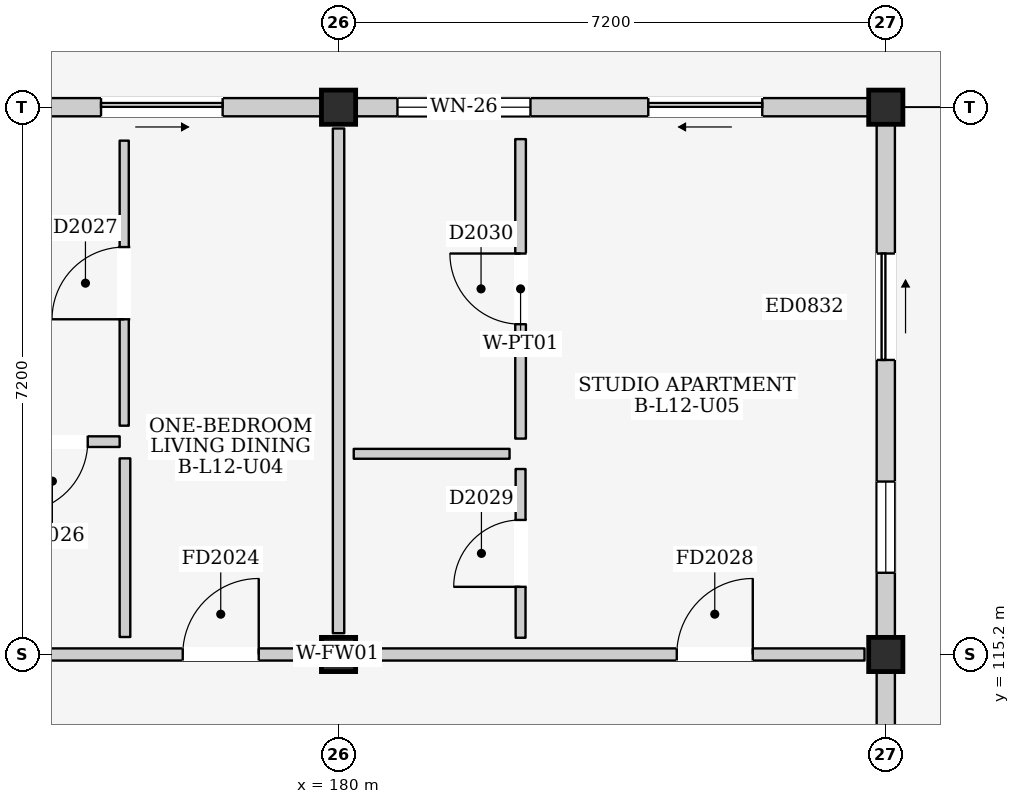
"""IFC4 building model, lengths in metres.
Left out: names, types, materials, properties, quantities, classifications, styles, units other than length and angle.
Written with IfcOpenShell. Run it as: python <this file> out.ifc"""

import sys

from ifc_helpers import new_model, si_unit, direction, frame, frame_2d, origin, origin_2d, place, context, subcontext, project, spatial, rectangle, extrude, element, fill, save


model = new_model("IFC4")
c1 = context("Model", 3, precision=1e-05, world=origin(), true_north=direction((0.0, 1.0)))
c2 = subcontext(c1, "Body", "Model", "MODEL_VIEW")
j1 = project(units=[si_unit("LENGTHUNIT", "METRE"), si_unit("PLANEANGLEUNIT", "RADIAN")], contexts=[c1])
p1 = place(None, origin())
s1 = spatial("IfcSite", under=j1, at=p1, CompositionType="ELEMENT")
p2 = place(p1, origin())
s2 = spatial("IfcBuilding", under=s1, at=p2, CompositionType="ELEMENT")
p3 = place(p2, frame((0.0, 0.0, 41.2)))
s3 = spatial("IfcBuildingStorey", under=s2, at=p3, CompositionType="ELEMENT", Elevation=41.2)
for number, where, z_axis, x_axis in (
    (1, (180.0, 115.2, 0.0), (0.0, 0.0, 1.0), (1.0, 0.0, 0.0)),
    (2, (180.0, 122.4, 0.0), (0.0, 0.0, 1.0), (1.0, 0.0, 0.0)),
    (3, (187.2, 115.2, 0.0), (0.0, 0.0, 1.0), (1.0, 0.0, 0.0)),
    (4, (187.2, 122.4, 0.0), (0.0, 0.0, 1.0), (1.0, 0.0, 0.0)),
):
    element("IfcColumn", number, at=place(p3, frame(where, z_axis=z_axis, x_axis=x_axis)), inside=s3, PredefinedType="COLUMN", context=c2, shape_type="SweptSolid", body=[
        extrude(rectangle(XDim=0.45, YDim=0.45, at=origin_2d()), origin(), (0.0, 0.0, 1.0), 3.2),
    ])
p4 = place(p3, frame((173.025, 122.4, 0.0), z_axis=(0.0, 0.0, 1.0), x_axis=(1.0, 0.0, 0.0)))
e5 = element("IfcWall", 5, at=p4, inside=s3, PredefinedType="ELEMENTEDWALL", context=c2, shape_type="SweptSolid", body=[
    extrude(rectangle(XDim=6.75, YDim=0.24, at=frame_2d((3.375, 0.0))), origin(), (0.0, 0.0, 1.0), 2.495),
])
p5 = place(p4, frame((3.85, 0.0, 0.0)))
e6 = element("IfcOpeningElement", 6, at=p5, cuts=e5, PredefinedType="OPENING", context=c2, shape_type="SweptSolid", body=[
    extrude(rectangle(XDim=1.6, YDim=2.12, at=frame_2d((0.8, 1.06))), frame((0.0, 0.135, 0.0), z_axis=(0.0, -1.0, 0.0), x_axis=(1.0, 0.0, 0.0)), (0.0, 0.0, 1.0), 0.27),
])
p6 = place(p4, frame((0.55, 0.0, 0.78)))
e7 = element("IfcOpeningElement", 7, at=p6, cuts=e5, PredefinedType="OPENING", context=c2, shape_type="SweptSolid", body=[
    extrude(rectangle(XDim=2.05, YDim=1.6, at=frame_2d((1.025, 0.8))), frame((0.0, 0.135, 0.0), z_axis=(0.0, -1.0, 0.0), x_axis=(1.0, 0.0, 0.0)), (0.0, 0.0, 1.0), 0.27),
])
p7 = place(p3, frame((187.2, 108.225, 0.0), z_axis=(0.0, 0.0, 1.0), x_axis=(0.0, 1.0, 0.0)))
e8 = element("IfcWall", 8, at=p7, inside=s3, PredefinedType="ELEMENTEDWALL", context=c2, shape_type="SweptSolid", body=[
    extrude(rectangle(XDim=6.75, YDim=0.24, at=frame_2d((3.375, 0.0))), origin(), (0.0, 0.0, 1.0), 2.495),
])
p8 = place(p7, frame((3.65, 0.0, 0.0)))
e9 = element("IfcOpeningElement", 9, at=p8, cuts=e8, PredefinedType="OPENING", context=c2, shape_type="SweptSolid", body=[
    extrude(rectangle(XDim=1.4, YDim=2.1, at=frame_2d((0.7, 1.05))), frame((0.0, 0.135, 0.0), z_axis=(0.0, -1.0, 0.0), x_axis=(1.0, 0.0, 0.0)), (0.0, 0.0, 1.0), 0.27),
])
p9 = place(p3, frame((180.225, 122.4, 0.0), z_axis=(0.0, 0.0, 1.0), x_axis=(1.0, 0.0, 0.0)))
e10 = element("IfcWall", 10, at=p9, inside=s3, PredefinedType="ELEMENTEDWALL", context=c2, shape_type="SweptSolid", body=[
    extrude(rectangle(XDim=6.75, YDim=0.24, at=frame_2d((3.375, 0.0))), origin(), (0.0, 0.0, 1.0), 2.495),
])
p10 = place(p9, frame((3.85, 0.0, 0.0)))
e11 = element("IfcOpeningElement", 11, at=p10, cuts=e10, PredefinedType="OPENING", context=c2, shape_type="SweptSolid", body=[
    extrude(rectangle(XDim=1.5, YDim=2.12, at=frame_2d((0.75, 1.06))), frame((0.0, 0.135, 0.0), z_axis=(0.0, -1.0, 0.0), x_axis=(1.0, 0.0, 0.0)), (0.0, 0.0, 1.0), 0.27),
])
p11 = place(p9, frame((0.55, 0.0, 0.83)))
e12 = element("IfcOpeningElement", 12, at=p11, cuts=e10, PredefinedType="OPENING", context=c2, shape_type="SweptSolid", body=[
    extrude(rectangle(XDim=1.75, YDim=1.55, at=frame_2d((0.875, 0.775))), frame((0.0, 0.135, 0.0), z_axis=(0.0, -1.0, 0.0), x_axis=(1.0, 0.0, 0.0)), (0.0, 0.0, 1.0), 0.27),
])
p12 = place(p3, frame((187.2, 115.425, 0.0), z_axis=(0.0, 0.0, 1.0), x_axis=(0.0, 1.0, 0.0)))
e13 = element("IfcWall", 13, at=p12, inside=s3, PredefinedType="ELEMENTEDWALL", context=c2, shape_type="SweptSolid", body=[
    extrude(rectangle(XDim=6.75, YDim=0.24, at=frame_2d((3.375, 0.0))), origin(), (0.0, 0.0, 1.0), 2.495),
])
p13 = place(p12, frame((3.65, 0.0, 0.0)))
e14 = element("IfcOpeningElement", 14, at=p13, cuts=e13, PredefinedType="OPENING", context=c2, shape_type="SweptSolid", body=[
    extrude(rectangle(XDim=1.4, YDim=2.1, at=frame_2d((0.7, 1.05))), frame((0.0, 0.135, 0.0), z_axis=(0.0, -1.0, 0.0), x_axis=(1.0, 0.0, 0.0)), (0.0, 0.0, 1.0), 0.27),
])
p14 = place(p12, frame((0.85, 0.0, 0.95)))
e15 = element("IfcOpeningElement", 15, at=p14, cuts=e13, PredefinedType="OPENING", context=c2, shape_type="SweptSolid", body=[
    extrude(rectangle(XDim=1.2, YDim=1.35, at=frame_2d((0.6, 0.675))), frame((0.0, 0.135, 0.0), z_axis=(0.0, -1.0, 0.0), x_axis=(1.0, 0.0, 0.0)), (0.0, 0.0, 1.0), 0.27),
])
p15 = place(p3, frame((173.055, 115.2, 0.0), z_axis=(0.0, 0.0, 1.0), x_axis=(1.0, 0.0, 0.0)))
e16 = element("IfcWall", 16, at=p15, inside=s3, PredefinedType="PARTITIONING", context=c2, shape_type="SweptSolid", body=[
    extrude(rectangle(XDim=6.69, YDim=0.16, at=frame_2d((3.345, 0.0))), origin(), (0.0, 0.0, 1.0), 2.345),
])
p16 = place(p15, frame((4.895, 0.0, 0.0)))
e17 = element("IfcOpeningElement", 17, at=p16, cuts=e16, PredefinedType="OPENING", context=c2, shape_type="SweptSolid", body=[
    extrude(rectangle(XDim=1.0, YDim=2.15, at=frame_2d((0.5, 1.075))), frame((0.0, 0.095, 0.0), z_axis=(0.0, -1.0, 0.0), x_axis=(1.0, 0.0, 0.0)), (0.0, 0.0, 1.0), 0.19),
])
p17 = place(p3, frame((180.0, 115.48, 0.0), z_axis=(0.0, 0.0, 1.0), x_axis=(0.0, 1.0, 0.0)))
e18 = element("IfcWall", 18, at=p17, inside=s3, PredefinedType="PARTITIONING", context=c2, shape_type="SweptSolid", body=[
    extrude(rectangle(XDim=6.64, YDim=0.15, at=frame_2d((3.32, 0.0))), origin(), (0.0, 0.0, 1.0), 2.445),
])
p18 = place(p3, frame((175.35, 118.0, 0.0), z_axis=(0.0, 0.0, 1.0), x_axis=(1.0, 0.0, 0.0)))
e19 = element("IfcWall", 19, at=p18, inside=s3, PredefinedType="PARTITIONING", context=c2, shape_type="SweptSolid", body=[
    extrude(rectangle(XDim=1.77, YDim=0.14, at=frame_2d((0.885, 0.0))), origin(), (0.0, 0.0, 1.0), 2.95),
])
p19 = place(p18, frame((0.42, 0.0, 0.0)))
e20 = element("IfcOpeningElement", 20, at=p19, cuts=e19, PredefinedType="OPENING", context=c2, shape_type="SweptSolid", body=[
    extrude(rectangle(XDim=0.93, YDim=2.14, at=frame_2d((0.465, 1.07))), frame((0.0, 0.085, 0.0), z_axis=(0.0, -1.0, 0.0), x_axis=(1.0, 0.0, 0.0)), (0.0, 0.0, 1.0), 0.17),
])
p20 = place(p3, frame((177.19, 115.43, 0.0), z_axis=(0.0, 0.0, 1.0), x_axis=(0.0, 1.0, 0.0)))
e21 = element("IfcWall", 21, at=p20, inside=s3, PredefinedType="PARTITIONING", context=c2, shape_type="SweptSolid", body=[
    extrude(rectangle(XDim=2.35, YDim=0.14, at=frame_2d((1.175, 0.0))), origin(), (0.0, 0.0, 1.0), 2.95),
])
p21 = place(p3, frame((177.18, 118.21, 0.0), z_axis=(0.0, 0.0, 1.0), x_axis=(0.0, 1.0, 0.0)))
e22 = element("IfcWall", 22, at=p21, inside=s3, PredefinedType="PARTITIONING", context=c2, shape_type="SweptSolid", body=[
    extrude(rectangle(XDim=3.75, YDim=0.12, at=frame_2d((1.875, 0.0))), origin(), (0.0, 0.0, 1.0), 2.95),
])
p22 = place(p21, frame((1.4, 0.0, 0.0)))
e23 = element("IfcOpeningElement", 23, at=p22, cuts=e22, PredefinedType="OPENING", context=c2, shape_type="SweptSolid", body=[
    extrude(rectangle(XDim=0.95, YDim=2.15, at=frame_2d((0.475, 1.075))), frame((0.0, 0.075, 0.0), z_axis=(0.0, -1.0, 0.0), x_axis=(1.0, 0.0, 0.0)), (0.0, 0.0, 1.0), 0.15),
])
p23 = place(p3, frame((180.255, 115.2, 0.0), z_axis=(0.0, 0.0, 1.0), x_axis=(1.0, 0.0, 0.0)))
e24 = element("IfcWall", 24, at=p23, inside=s3, PredefinedType="PARTITIONING", context=c2, shape_type="SweptSolid", body=[
    extrude(rectangle(XDim=6.665, YDim=0.16, at=frame_2d((3.333, 0.0))), origin(), (0.0, 0.0, 1.0), 2.345),
])
p24 = place(p23, frame((4.195, 0.0, 0.0)))
e25 = element("IfcOpeningElement", 25, at=p24, cuts=e24, PredefinedType="OPENING", context=c2, shape_type="SweptSolid", body=[
    extrude(rectangle(XDim=1.0, YDim=2.15, at=frame_2d((0.5, 1.075))), frame((0.0, 0.095, 0.0), z_axis=(0.0, -1.0, 0.0), x_axis=(1.0, 0.0, 0.0)), (0.0, 0.0, 1.0), 0.19),
])
p25 = place(p3, frame((180.2, 117.84, 0.0), z_axis=(0.0, 0.0, 1.0), x_axis=(1.0, 0.0, 0.0)))
e26 = element("IfcWall", 26, at=p25, inside=s3, PredefinedType="PARTITIONING", context=c2, shape_type="SweptSolid", body=[
    extrude(rectangle(XDim=2.05, YDim=0.13, at=frame_2d((1.025, 0.0))), origin(), (0.0, 0.0, 1.0), 2.95),
])
p26 = place(p3, frame((182.395, 115.42, 0.0), z_axis=(0.0, 0.0, 1.0), x_axis=(0.0, 1.0, 0.0)))
e27 = element("IfcWall", 27, at=p26, inside=s3, PredefinedType="PARTITIONING", context=c2, shape_type="SweptSolid", body=[
    extrude(rectangle(XDim=2.22, YDim=0.13, at=frame_2d((1.11, 0.0))), origin(), (0.0, 0.0, 1.0), 2.95),
])
p27 = place(p26, frame((0.67, 0.0, 0.0)))
e28 = element("IfcOpeningElement", 28, at=p27, cuts=e27, PredefinedType="OPENING", context=c2, shape_type="SweptSolid", body=[
    extrude(rectangle(XDim=0.88, YDim=2.1, at=frame_2d((0.44, 1.05))), frame((0.0, 0.08, 0.0), z_axis=(0.0, -1.0, 0.0), x_axis=(1.0, 0.0, 0.0)), (0.0, 0.0, 1.0), 0.16),
])
p28 = place(p3, frame((182.395, 118.04, 0.0), z_axis=(0.0, 0.0, 1.0), x_axis=(0.0, 1.0, 0.0)))
e29 = element("IfcWall", 29, at=p28, inside=s3, PredefinedType="PARTITIONING", context=c2, shape_type="SweptSolid", body=[
    extrude(rectangle(XDim=3.94, YDim=0.14, at=frame_2d((1.97, 0.0))), origin(), (0.0, 0.0, 1.0), 2.95),
])
p29 = place(p28, frame((1.505, 0.0, 0.0)))
e30 = element("IfcOpeningElement", 30, at=p29, cuts=e29, PredefinedType="OPENING", context=c2, shape_type="SweptSolid", body=[
    extrude(rectangle(XDim=0.93, YDim=2.14, at=frame_2d((0.465, 1.07))), frame((0.0, 0.085, 0.0), z_axis=(0.0, -1.0, 0.0), x_axis=(1.0, 0.0, 0.0)), (0.0, 0.0, 1.0), 0.17),
])
p30 = place(p5, frame((1.6, 0.0, 0.0), z_axis=(0.0, 0.0, 1.0), x_axis=(-1.0, 0.0, 0.0)))
e31 = element("IfcDoor", 31, at=p30, inside=s3, OperationType="SLIDING_TO_RIGHT", PredefinedType="DOOR", context=c2, shape_type="SweptSolid", body=[
    extrude(rectangle(XDim=1.6, YDim=2.12, at=frame_2d((0.8, 1.06))), frame((0.0, 0.025, 0.0), z_axis=(0.0, -1.0, 0.0), x_axis=(1.0, 0.0, 0.0)), (0.0, 0.0, 1.0), 0.05),
])
fill(e6, e31)
p31 = place(p10, frame((1.5, 0.0, 0.0), z_axis=(0.0, 0.0, 1.0), x_axis=(-1.0, 0.0, 0.0)))
e32 = element("IfcDoor", 32, at=p31, inside=s3, OperationType="SLIDING_TO_LEFT", PredefinedType="DOOR", context=c2, shape_type="SweptSolid", body=[
    extrude(rectangle(XDim=1.5, YDim=2.12, at=frame_2d((0.75, 1.06))), frame((0.0, 0.025, 0.0), z_axis=(0.0, -1.0, 0.0), x_axis=(1.0, 0.0, 0.0)), (0.0, 0.0, 1.0), 0.05),
])
fill(e11, e32)
p32 = place(p11, origin())
e33 = element("IfcWindow", 33, at=p32, inside=s3, PartitioningType="DOUBLE_PANEL_VERTICAL", PredefinedType="WINDOW", context=c2, shape_type="SweptSolid", body=[
    extrude(rectangle(XDim=1.75, YDim=1.55, at=frame_2d((0.875, 0.775))), frame((0.0, 0.03, 0.0), z_axis=(0.0, -1.0, 0.0), x_axis=(1.0, 0.0, 0.0)), (0.0, 0.0, 1.0), 0.06),
])
fill(e12, e33)
p33 = place(p13, frame((1.4, 0.0, 0.0), z_axis=(0.0, 0.0, 1.0), x_axis=(-1.0, 0.0, 0.0)))
e34 = element("IfcDoor", 34, at=p33, inside=s3, OperationType="SLIDING_TO_RIGHT", PredefinedType="DOOR", context=c2, shape_type="SweptSolid", body=[
    extrude(rectangle(XDim=1.4, YDim=2.1, at=frame_2d((0.7, 1.05))), frame((0.0, 0.025, 0.0), z_axis=(0.0, -1.0, 0.0), x_axis=(1.0, 0.0, 0.0)), (0.0, 0.0, 1.0), 0.05),
])
fill(e14, e34)
p34 = place(p14, origin())
e35 = element("IfcWindow", 35, at=p34, inside=s3, PartitioningType="SINGLE_PANEL", PredefinedType="WINDOW", context=c2, shape_type="SweptSolid", body=[
    extrude(rectangle(XDim=1.2, YDim=1.35, at=frame_2d((0.6, 0.675))), frame((0.0, 0.03, 0.0), z_axis=(0.0, -1.0, 0.0), x_axis=(1.0, 0.0, 0.0)), (0.0, 0.0, 1.0), 0.06),
])
fill(e15, e35)
p35 = place(p16, origin())
e36 = element("IfcDoor", 36, at=p35, inside=s3, OperationType="SINGLE_SWING_RIGHT", PredefinedType="DOOR", context=c2, shape_type="SweptSolid", body=[
    extrude(rectangle(XDim=1.0, YDim=2.15, at=frame_2d((0.5, 1.075))), frame((0.0, 0.025, 0.0), z_axis=(0.0, -1.0, 0.0), x_axis=(1.0, 0.0, 0.0)), (0.0, 0.0, 1.0), 0.05),
])
fill(e17, e36)
p36 = place(p19, frame((0.93, 0.0, 0.0), z_axis=(0.0, 0.0, 1.0), x_axis=(-1.0, 0.0, 0.0)))
e37 = element("IfcDoor", 37, at=p36, inside=s3, OperationType="SINGLE_SWING_RIGHT", PredefinedType="DOOR", context=c2, shape_type="SweptSolid", body=[
    extrude(rectangle(XDim=0.93, YDim=2.14, at=frame_2d((0.465, 1.07))), frame((0.0, 0.025, 0.0), z_axis=(0.0, -1.0, 0.0), x_axis=(1.0, 0.0, 0.0)), (0.0, 0.0, 1.0), 0.05),
])
fill(e20, e37)
p37 = place(p22, origin())
e38 = element("IfcDoor", 38, at=p37, inside=s3, OperationType="SINGLE_SWING_LEFT", PredefinedType="DOOR", context=c2, shape_type="SweptSolid", body=[
    extrude(rectangle(XDim=0.95, YDim=2.15, at=frame_2d((0.475, 1.075))), frame((0.0, 0.025, 0.0), z_axis=(0.0, -1.0, 0.0), x_axis=(1.0, 0.0, 0.0)), (0.0, 0.0, 1.0), 0.05),
])
fill(e23, e38)
p38 = place(p24, origin())
e39 = element("IfcDoor", 39, at=p38, inside=s3, OperationType="SINGLE_SWING_RIGHT", PredefinedType="DOOR", context=c2, shape_type="SweptSolid", body=[
    extrude(rectangle(XDim=1.0, YDim=2.15, at=frame_2d((0.5, 1.075))), frame((0.0, 0.025, 0.0), z_axis=(0.0, -1.0, 0.0), x_axis=(1.0, 0.0, 0.0)), (0.0, 0.0, 1.0), 0.05),
])
fill(e25, e39)
p39 = place(p27, origin())
e40 = element("IfcDoor", 40, at=p39, inside=s3, OperationType="SINGLE_SWING_LEFT", PredefinedType="DOOR", context=c2, shape_type="SweptSolid", body=[
    extrude(rectangle(XDim=0.88, YDim=2.1, at=frame_2d((0.44, 1.05))), frame((0.0, 0.025, 0.0), z_axis=(0.0, -1.0, 0.0), x_axis=(1.0, 0.0, 0.0)), (0.0, 0.0, 1.0), 0.05),
])
fill(e28, e40)
p40 = place(p29, origin())
e41 = element("IfcDoor", 41, at=p40, inside=s3, OperationType="SINGLE_SWING_RIGHT", PredefinedType="DOOR", context=c2, shape_type="SweptSolid", body=[
    extrude(rectangle(XDim=0.93, YDim=2.14, at=frame_2d((0.465, 1.07))), frame((0.0, 0.025, 0.0), z_axis=(0.0, -1.0, 0.0), x_axis=(1.0, 0.0, 0.0)), (0.0, 0.0, 1.0), 0.05),
])
fill(e30, e41)
save(model, sys.argv[1])
